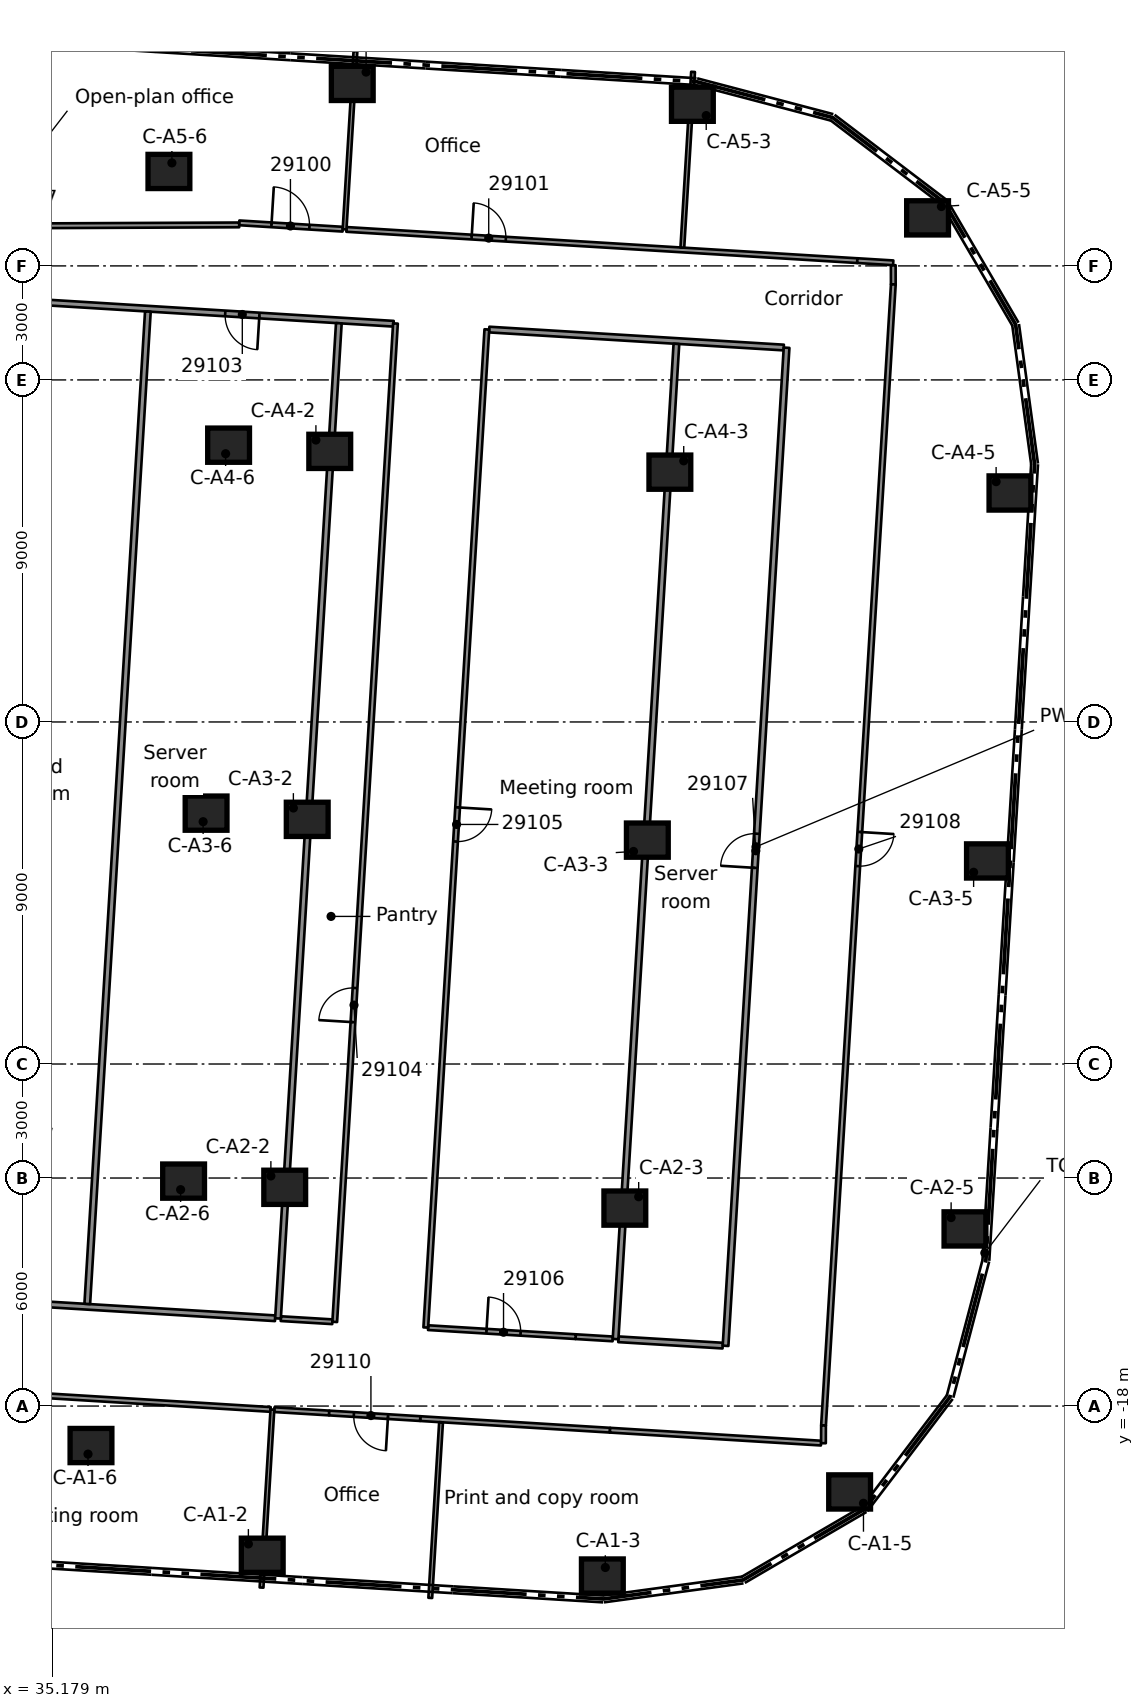
"""IFC4 building model, lengths in metres.
Left out: names, types, materials, properties, quantities, classifications, styles, units other than length and angle.
Written with IfcOpenShell. Run it as: python <this file> out.ifc"""

import sys

from ifc_helpers import new_model, si_unit, direction, frame, frame_2d, origin, origin_2d, place, context, subcontext, project, spatial, rectangle, extrude, element, fill, save


model = new_model("IFC4")
c1 = context("Model", 3, precision=1e-05, world=origin(), true_north=direction((0.0, 1.0)))
c2 = subcontext(c1, "Body", "Model", "MODEL_VIEW")
j1 = project(units=[si_unit("LENGTHUNIT", "METRE"), si_unit("PLANEANGLEUNIT", "RADIAN")], contexts=[c1])
p1 = place(None, origin())
s1 = spatial("IfcSite", under=j1, at=p1, CompositionType="ELEMENT")
p2 = place(p1, origin())
s2 = spatial("IfcBuilding", under=s1, at=p2, CompositionType="ELEMENT")
p3 = place(p2, frame((0.0, 0.0, 149.1)))
s3 = spatial("IfcBuildingStorey", under=s2, at=p3, CompositionType="ELEMENT", Elevation=149.1)
for number, where, z_axis, x_axis in (
    (1, (40.704, -21.926, 0.0), (0.0, 0.0, 1.0), (1.0, 0.0, 0.0)),
    (2, (49.654, -22.473, 0.0), (0.0, 0.0, 1.0), (1.0, 0.0, 0.0)),
    (3, (56.161, -20.26, 0.0), (0.0, 0.0, 1.0), (1.0, 0.0, 0.0)),
    (4, (36.198, -19.039, 0.0), (0.0, 0.0, 1.0), (1.0, 0.0, 0.0)),
    (5, (41.296, -12.244, 0.0), (0.0, 0.0, 1.0), (1.0, 0.0, 0.0)),
    (6, (50.246, -12.791, 0.0), (0.0, 0.0, 1.0), (1.0, 0.0, 0.0)),
    (7, (59.196, -13.339, 0.0), (0.0, 0.0, 1.0), (1.0, 0.0, 0.0)),
    (8, (38.635, -12.081, 0.0), (0.0, 0.0, 1.0), (1.0, 0.0, 0.0)),
    (9, (41.888, -2.562, 0.0), (0.0, 0.0, 1.0), (1.0, 0.0, 0.0)),
    (10, (50.838, -3.109, 0.0), (0.0, 0.0, 1.0), (1.0, 0.0, 0.0)),
    (11, (59.788, -3.657, 0.0), (0.0, 0.0, 1.0), (1.0, 0.0, 0.0)),
    (12, (39.227, -2.399, 0.0), (0.0, 0.0, 1.0), (1.0, 0.0, 0.0)),
    (13, (42.481, 7.12, 0.0), (0.0, 0.0, 1.0), (1.0, 0.0, 0.0)),
    (14, (51.431, 6.573, 0.0), (0.0, 0.0, 1.0), (1.0, 0.0, 0.0)),
    (15, (60.38, 6.025, 0.0), (0.0, 0.0, 1.0), (1.0, 0.0, 0.0)),
    (16, (39.819, 7.283, 0.0), (0.0, 0.0, 1.0), (1.0, 0.0, 0.0)),
    (17, (43.073, 16.802, 0.0), (0.0, 0.0, 1.0), (1.0, 0.0, 0.0)),
    (18, (52.023, 16.254, 0.0), (0.0, 0.0, 1.0), (1.0, 0.0, 0.0)),
    (19, (58.212, 13.264, 0.0), (0.0, 0.0, 1.0), (1.0, 0.0, 0.0)),
    (20, (38.249, 14.485, 0.0), (0.0, 0.0, 1.0), (1.0, 0.0, 0.0)),
):
    element("IfcColumn", number, at=place(p3, frame(where, z_axis=z_axis, x_axis=x_axis)), inside=s3, PredefinedType="COLUMN", context=c2, shape_type="SweptSolid", body=[
        extrude(rectangle(XDim=1.1, YDim=0.9, at=origin_2d()), origin(), (0.0, 0.0, 1.0), 3.5),
    ])
p4 = place(p3, frame((57.309, 12.018, 0.0), z_axis=(0.0, 0.0, 1.0), x_axis=(0.001937042371, -0.999998123932, 0.0)))
e21 = element("IfcWall", 21, at=p4, inside=s3, PredefinedType="PARTITIONING", context=c2, shape_type="SweptSolid", body=[
    extrude(rectangle(XDim=0.504, YDim=0.125, at=frame_2d((0.252, 0.0))), origin(), (0.0, 0.0, 1.0), 3.08),
])
p5 = place(p3, frame((41.022, -18.095, 0.0), z_axis=(0.0, 0.0, 1.0), x_axis=(0.9981427784, -0.060917927811, 0.0)))
e22 = element("IfcWall", 22, at=p5, inside=s3, PredefinedType="PARTITIONING", context=c2, shape_type="SweptSolid", body=[
    extrude(rectangle(XDim=1.447, YDim=0.125, at=frame_2d((0.723, 0.0))), origin(), (0.0, 0.0, 1.0), 3.08),
])
p6 = place(p3, frame((49.855, -18.635, 0.0), z_axis=(0.0, 0.0, 1.0), x_axis=(-0.998140256912, 0.060959228443, 0.0)))
e23 = element("IfcWall", 23, at=p6, inside=s3, PredefinedType="PARTITIONING", context=c2, shape_type="SweptSolid", body=[
    extrude(rectangle(XDim=5.002, YDim=0.125, at=frame_2d((2.501, 0.0))), origin(), (0.0, 0.0, 1.0), 3.08),
])
p7 = place(p3, frame((49.855, -18.635, 0.0), z_axis=(0.0, 0.0, 1.0), x_axis=(0.998130487354, -0.061118984082, 0.0)))
e24 = element("IfcWall", 24, at=p7, inside=s3, PredefinedType="PARTITIONING", context=c2, shape_type="SweptSolid", body=[
    extrude(rectangle(XDim=5.564, YDim=0.125, at=frame_2d((2.782, 0.0))), origin(), (0.0, 0.0, 1.0), 3.08),
])
p8 = place(p3, frame((40.923, -18.089, 0.0), z_axis=(0.0, 0.0, 1.0), x_axis=(-0.998135704692, 0.06103372034, 0.0)))
e25 = element("IfcWall", 25, at=p8, inside=s3, PredefinedType="PARTITIONING", context=c2, shape_type="SweptSolid", body=[
    extrude(rectangle(XDim=10.208, YDim=0.125, at=frame_2d((5.104, 0.0))), origin(), (0.0, 0.0, 1.0), 3.08),
])
p9 = place(p8, frame((7.938, 0.0, 0.0)))
e26 = element("IfcOpeningElement", 26, at=p9, cuts=e25, PredefinedType="OPENING", context=c2, shape_type="SweptSolid", body=[
    extrude(rectangle(XDim=0.9, YDim=2.1, at=frame_2d((0.45, 1.05))), frame((0.0, 0.073, 0.0), z_axis=(0.0, -1.0, 0.0), x_axis=(1.0, 0.0, 0.0)), (0.0, 0.0, 1.0), 0.145),
])
p10 = place(p3, frame((44.862, -18.33, 0.0), z_axis=(0.0, 0.0, 1.0), x_axis=(-0.998123937102, 0.061225862048, 0.0)))
e27 = element("IfcWall", 27, at=p10, inside=s3, PredefinedType="PARTITIONING", context=c2, shape_type="SweptSolid", body=[
    extrude(rectangle(XDim=2.4, YDim=0.125, at=frame_2d((1.2, 0.0))), origin(), (0.0, 0.0, 1.0), 3.08),
])
p11 = place(p10, frame((0.85, 0.0, 0.0)))
e28 = element("IfcOpeningElement", 28, at=p11, cuts=e27, PredefinedType="OPENING", context=c2, shape_type="SweptSolid", body=[
    extrude(rectangle(XDim=0.9, YDim=2.1, at=frame_2d((0.45, 1.05))), frame((0.0, 0.073, 0.0), z_axis=(0.0, -1.0, 0.0), x_axis=(1.0, 0.0, 0.0)), (0.0, 0.0, 1.0), 0.145),
])
p12 = place(p3, frame((41.194, -15.7, 0.0), z_axis=(0.0, 0.0, 1.0), x_axis=(0.998175067926, -0.060386536338, 0.0)))
e29 = element("IfcWall", 29, at=p12, inside=s3, PredefinedType="PARTITIONING", context=c2, shape_type="SweptSolid", body=[
    extrude(rectangle(XDim=1.358, YDim=0.125, at=frame_2d((0.679, 0.0))), origin(), (0.0, 0.0, 1.0), 3.08),
])
p13 = place(p3, frame((48.952, -16.174, 0.0), z_axis=(0.0, 0.0, 1.0), x_axis=(0.998184467613, -0.060230960615, 0.0)))
e30 = element("IfcWall", 30, at=p13, inside=s3, PredefinedType="PARTITIONING", context=c2, shape_type="SweptSolid", body=[
    extrude(rectangle(XDim=0.977, YDim=0.125, at=frame_2d((0.488, 0.0))), origin(), (0.0, 0.0, 1.0), 3.08),
])
p14 = place(p3, frame((31.165, -15.087, 0.0), z_axis=(0.0, 0.0, 1.0), x_axis=(0.998142132741, -0.060928506027, 0.0)))
e31 = element("IfcWall", 31, at=p14, inside=s3, PredefinedType="PARTITIONING", context=c2, shape_type="SweptSolid", body=[
    extrude(rectangle(XDim=9.897, YDim=0.15, at=frame_2d((4.949, 0.0))), origin(), (0.0, 0.0, 1.0), 3.08),
])
p15 = place(p14, frame((2.006, 0.0, 0.0)))
e32 = element("IfcOpeningElement", 32, at=p15, cuts=e31, PredefinedType="OPENING", context=c2, shape_type="SweptSolid", body=[
    extrude(rectangle(XDim=0.9, YDim=2.1, at=frame_2d((0.45, 1.05))), frame((0.0, 0.085, 0.0), z_axis=(0.0, -1.0, 0.0), x_axis=(1.0, 0.0, 0.0)), (0.0, 0.0, 1.0), 0.17),
])
p16 = place(p3, frame((45.07, -15.937, 0.0), z_axis=(0.0, 0.0, 1.0), x_axis=(0.998140477109, -0.060955622847, 0.0)))
e33 = element("IfcWall", 33, at=p16, inside=s3, PredefinedType="PARTITIONING", context=c2, shape_type="SweptSolid", body=[
    extrude(rectangle(XDim=3.889, YDim=0.125, at=frame_2d((1.945, 0.0))), origin(), (0.0, 0.0, 1.0), 3.08),
])
p17 = place(p16, frame((1.538, 0.0, 0.0)))
e34 = element("IfcOpeningElement", 34, at=p17, cuts=e33, PredefinedType="OPENING", context=c2, shape_type="SweptSolid", body=[
    extrude(rectangle(XDim=0.9, YDim=2.1, at=frame_2d((0.45, 1.05))), frame((0.0, 0.073, 0.0), z_axis=(0.0, -1.0, 0.0), x_axis=(1.0, 0.0, 0.0)), (0.0, 0.0, 1.0), 0.145),
])
p18 = place(p3, frame((50.077, -16.243, 0.0), z_axis=(0.0, 0.0, 1.0), x_axis=(0.998153516583, -0.060741726454, 0.0)))
e35 = element("IfcWall", 35, at=p18, inside=s3, PredefinedType="PARTITIONING", context=c2, shape_type="SweptSolid", body=[
    extrude(rectangle(XDim=2.749, YDim=0.15, at=frame_2d((1.375, 0.0))), origin(), (0.0, 0.0, 1.0), 3.08),
])
p19 = place(p3, frame((44.16, 10.478, 0.0), z_axis=(0.0, 0.0, 1.0), x_axis=(-0.998127894331, 0.061161315872, 0.0)))
e36 = element("IfcWall", 36, at=p19, inside=s3, PredefinedType="PARTITIONING", context=c2, shape_type="SweptSolid", body=[
    extrude(rectangle(XDim=11.428, YDim=0.15, at=frame_2d((5.714, 0.0))), origin(), (0.0, 0.0, 1.0), 3.08),
])
p20 = place(p19, frame((3.538, 0.0, 0.0)))
e37 = element("IfcOpeningElement", 37, at=p20, cuts=e36, PredefinedType="OPENING", context=c2, shape_type="SweptSolid", body=[
    extrude(rectangle(XDim=0.9, YDim=2.1, at=frame_2d((0.45, 1.05))), frame((0.0, 0.085, 0.0), z_axis=(0.0, -1.0, 0.0), x_axis=(1.0, 0.0, 0.0)), (0.0, 0.0, 1.0), 0.17),
])
p21 = place(p3, frame((46.677, 10.325, 0.0), z_axis=(0.0, 0.0, 1.0), x_axis=(0.998143498814, -0.060906122644, 0.0)))
e38 = element("IfcWall", 38, at=p21, inside=s3, PredefinedType="PARTITIONING", context=c2, shape_type="SweptSolid", body=[
    extrude(rectangle(XDim=7.764, YDim=0.15, at=frame_2d((3.882, 0.0))), origin(), (0.0, 0.0, 1.0), 3.08),
])
p22 = place(p3, frame((42.921, 12.96, 0.0), z_axis=(0.0, 0.0, 1.0), x_axis=(0.998135679052, -0.061034139647, 0.0)))
e39 = element("IfcWall", 39, at=p22, inside=s3, PredefinedType="PARTITIONING", context=c2, shape_type="SweptSolid", body=[
    extrude(rectangle(XDim=13.468, YDim=0.125, at=frame_2d((6.734, 0.0))), origin(), (0.0, 0.0, 1.0), 3.08),
])
p23 = place(p22, frame((3.3, 0.0, 0.0)))
e40 = element("IfcOpeningElement", 40, at=p23, cuts=e39, PredefinedType="OPENING", context=c2, shape_type="SweptSolid", body=[
    extrude(rectangle(XDim=0.9, YDim=2.1, at=frame_2d((0.45, 1.05))), frame((0.0, 0.073, 0.0), z_axis=(0.0, -1.0, 0.0), x_axis=(1.0, 0.0, 0.0)), (0.0, 0.0, 1.0), 0.145),
])
p24 = place(p3, frame((40.099, 13.133, 0.0), z_axis=(0.0, 0.0, 1.0), x_axis=(0.998123336101, -0.061235658973, 0.0)))
e41 = element("IfcWall", 41, at=p24, inside=s3, PredefinedType="PARTITIONING", context=c2, shape_type="SweptSolid", body=[
    extrude(rectangle(XDim=2.727, YDim=0.125, at=frame_2d((1.364, 0.0))), origin(), (0.0, 0.0, 1.0), 3.08),
])
p25 = place(p24, frame((0.85, 0.0, 0.0)))
e42 = element("IfcOpeningElement", 42, at=p25, cuts=e41, PredefinedType="OPENING", context=c2, shape_type="SweptSolid", body=[
    extrude(rectangle(XDim=1.0, YDim=2.1, at=frame_2d((0.5, 1.05))), frame((0.0, 0.073, 0.0), z_axis=(0.0, -1.0, 0.0), x_axis=(1.0, 0.0, 0.0)), (0.0, 0.0, 1.0), 0.145),
])
p26 = place(p3, frame((56.362, 12.139, 0.0), z_axis=(0.0, 0.0, 1.0), x_axis=(0.998134879302, -0.061047217134, 0.0)))
e43 = element("IfcWall", 43, at=p26, inside=s3, PredefinedType="PARTITIONING", context=c2, shape_type="SweptSolid", body=[
    extrude(rectangle(XDim=0.948, YDim=0.125, at=frame_2d((0.474, 0.0))), origin(), (0.0, 0.0, 1.0), 3.08),
])
p27 = place(p3, frame((31.471, 13.041, 0.0), z_axis=(0.0, 0.0, 1.0), x_axis=(0.999990255084, 0.004414718129, 0.0)))
e44 = element("IfcWall", 44, at=p27, inside=s3, PredefinedType="PARTITIONING", context=c2, shape_type="SweptSolid", body=[
    extrude(rectangle(XDim=8.627, YDim=0.125, at=frame_2d((4.313, 0.0))), origin(), (0.0, 0.0, 1.0), 3.08),
])
p28 = place(p3, frame((57.311, 11.514, 0.0), z_axis=(0.0, 0.0, 1.0), x_axis=(-0.061067487699, -0.998133639322, 0.0)))
e45 = element("IfcWall", 45, at=p28, inside=s3, PredefinedType="PARTITIONING", context=c2, shape_type="SweptSolid", body=[
    extrude(rectangle(XDim=30.08, YDim=0.125, at=frame_2d((15.04, 0.0))), origin(), (0.0, 0.0, 1.0), 3.08),
])
p29 = place(p28, frame((14.435, 0.0, 0.0)))
e46 = element("IfcOpeningElement", 46, at=p29, cuts=e45, PredefinedType="OPENING", context=c2, shape_type="SweptSolid", body=[
    extrude(rectangle(XDim=0.9, YDim=2.1, at=frame_2d((0.45, 1.05))), frame((0.0, 0.073, 0.0), z_axis=(0.0, -1.0, 0.0), x_axis=(1.0, 0.0, 0.0)), (0.0, 0.0, 1.0), 0.145),
])
p30 = place(p3, frame((52.896, -16.415, 0.0), z_axis=(0.0, 0.0, 1.0), x_axis=(0.061037428755, 0.998135477924, 0.0)))
e47 = element("IfcWall", 47, at=p30, inside=s3, PredefinedType="PARTITIONING", context=c2, shape_type="SweptSolid", body=[
    extrude(rectangle(XDim=26.311, YDim=0.15, at=frame_2d((13.156, 0.0))), origin(), (0.0, 0.0, 1.0), 3.08),
])
p31 = place(p30, frame((12.6, 0.0, 0.0)))
e48 = element("IfcOpeningElement", 48, at=p31, cuts=e47, PredefinedType="OPENING", context=c2, shape_type="SweptSolid", body=[
    extrude(rectangle(XDim=0.9, YDim=2.1, at=frame_2d((0.45, 1.05))), frame((0.0, 0.085, 0.0), z_axis=(0.0, -1.0, 0.0), x_axis=(1.0, 0.0, 0.0)), (0.0, 0.0, 1.0), 0.17),
])
p32 = place(p3, frame((50.002, -16.238, 0.0), z_axis=(0.0, 0.0, 1.0), x_axis=(0.061026057913, 0.998136173203, 0.0)))
e49 = element("IfcWall", 49, at=p32, inside=s3, PredefinedType="PARTITIONING", context=c2, shape_type="SweptSolid", body=[
    extrude(rectangle(XDim=26.236, YDim=0.15, at=frame_2d((13.118, 0.0))), origin(), (0.0, 0.0, 1.0), 3.08),
])
p33 = place(p3, frame((51.759, 12.482, 0.0), z_axis=(0.0, 0.0, 1.0), x_axis=(0.060881783699, 0.998144983664, 0.0)))
e50 = element("IfcWall", 50, at=p33, inside=s3, PredefinedType="PARTITIONING", context=c2, shape_type="SweptSolid", body=[
    extrude(rectangle(XDim=4.632, YDim=0.1, at=frame_2d((2.316, 0.0))), origin(), (0.0, 0.0, 1.0), 3.08),
])
p34 = place(p3, frame((45.126, -23.048, 0.0), z_axis=(0.0, 0.0, 1.0), x_axis=(0.061314799781, 0.998118477601, 0.0)))
e51 = element("IfcWall", 51, at=p34, inside=s3, PredefinedType="PARTITIONING", context=c2, shape_type="SweptSolid", body=[
    extrude(rectangle(XDim=4.631, YDim=0.1, at=frame_2d((2.315, 0.0))), origin(), (0.0, 0.0, 1.0), 3.08),
])
p35 = place(p3, frame((46.615, 10.329, 0.0), z_axis=(0.0, 0.0, 1.0), x_axis=(-0.061073840806, -0.998133250608, 0.0)))
e52 = element("IfcWall", 52, at=p35, inside=s3, PredefinedType="PARTITIONING", context=c2, shape_type="SweptSolid", body=[
    extrude(rectangle(XDim=26.311, YDim=0.125, at=frame_2d((13.156, 0.0))), origin(), (0.0, 0.0, 1.0), 3.08),
])
p36 = place(p35, frame((12.6, 0.0, 0.0)))
e53 = element("IfcOpeningElement", 53, at=p36, cuts=e52, PredefinedType="OPENING", context=c2, shape_type="SweptSolid", body=[
    extrude(rectangle(XDim=0.9, YDim=2.1, at=frame_2d((0.45, 1.05))), frame((0.0, 0.073, 0.0), z_axis=(0.0, -1.0, 0.0), x_axis=(1.0, 0.0, 0.0)), (0.0, 0.0, 1.0), 0.145),
])
p37 = place(p3, frame((42.612, -15.786, 0.0), z_axis=(0.0, 0.0, 1.0), x_axis=(0.060711547525, 0.998155352637, 0.0)))
e54 = element("IfcWall", 54, at=p37, inside=s3, PredefinedType="PARTITIONING", context=c2, shape_type="SweptSolid", body=[
    extrude(rectangle(XDim=26.32, YDim=0.125, at=frame_2d((13.16, 0.0))), origin(), (0.0, 0.0, 1.0), 3.08),
])
p38 = place(p37, frame((7.902, 0.0, 0.0)))
e55 = element("IfcOpeningElement", 55, at=p38, cuts=e54, PredefinedType="OPENING", context=c2, shape_type="SweptSolid", body=[
    extrude(rectangle(XDim=0.9, YDim=2.1, at=frame_2d((0.45, 1.05))), frame((0.0, 0.073, 0.0), z_axis=(0.0, -1.0, 0.0), x_axis=(1.0, 0.0, 0.0)), (0.0, 0.0, 1.0), 0.145),
])
p39 = place(p3, frame((40.686, -22.776, 0.0), z_axis=(0.0, 0.0, 1.0), x_axis=(0.060923886766, 0.998142414699, 0.0)))
e56 = element("IfcWall", 56, at=p39, inside=s3, PredefinedType="PARTITIONING", context=c2, shape_type="SweptSolid", body=[
    extrude(rectangle(XDim=4.693, YDim=0.1, at=frame_2d((2.346, 0.0))), origin(), (0.0, 0.0, 1.0), 3.08),
])
p40 = place(p3, frame((41.119, -15.695, 0.0), z_axis=(0.0, 0.0, 1.0), x_axis=(0.061026057913, 0.998136173203, 0.0)))
e57 = element("IfcWall", 57, at=p40, inside=s3, PredefinedType="PARTITIONING", context=c2, shape_type="SweptSolid", body=[
    extrude(rectangle(XDim=26.236, YDim=0.15, at=frame_2d((13.118, 0.0))), origin(), (0.0, 0.0, 1.0), 3.08),
])
p41 = place(p3, frame((42.871, 12.963, 0.0), z_axis=(0.0, 0.0, 1.0), x_axis=(0.0609080718, 0.998143379876, 0.0)))
e58 = element("IfcWall", 58, at=p41, inside=s3, PredefinedType="PARTITIONING", context=c2, shape_type="SweptSolid", body=[
    extrude(rectangle(XDim=4.694, YDim=0.1, at=frame_2d((2.347, 0.0))), origin(), (0.0, 0.0, 1.0), 3.08),
])
p42 = place(p3, frame((36.1, -15.313, 0.0), z_axis=(0.0, 0.0, 1.0), x_axis=(0.060968133748, 0.998139713, 0.0)))
e59 = element("IfcWall", 59, at=p42, inside=s3, PredefinedType="PARTITIONING", context=c2, shape_type="SweptSolid", body=[
    extrude(rectangle(XDim=26.161, YDim=0.15, at=frame_2d((13.08, 0.0))), origin(), (0.0, 0.0, 1.0), 3.08),
])
p43 = place(p3, frame((55.472, -18.978, 0.0), z_axis=(0.0, 0.0, 1.0), x_axis=(0.004694783941, 0.999988979441, 0.0)))
e60 = element("IfcWall", 60, at=p43, inside=s3, PredefinedType="PARTITIONING", context=c2, shape_type="SweptSolid", body=[
    extrude(rectangle(XDim=0.468, YDim=0.125, at=frame_2d((0.234, 0.0))), origin(), (0.0, 0.0, 1.0), 3.08),
])
p44 = place(p25, origin())
e61 = element("IfcDoor", 61, at=p44, inside=s3, OperationType="SINGLE_SWING_LEFT", PredefinedType="DOOR", context=c2, shape_type="SweptSolid", body=[
    extrude(rectangle(XDim=1.0, YDim=2.1, at=frame_2d((0.5, 1.05))), frame((0.0, 0.025, 0.0), z_axis=(0.0, -1.0, 0.0), x_axis=(1.0, 0.0, 0.0)), (0.0, 0.0, 1.0), 0.05),
])
fill(e42, e61)
p45 = place(p23, origin())
e62 = element("IfcDoor", 62, at=p45, inside=s3, OperationType="SINGLE_SWING_LEFT", PredefinedType="DOOR", context=c2, shape_type="SweptSolid", body=[
    extrude(rectangle(XDim=0.9, YDim=2.1, at=frame_2d((0.45, 1.05))), frame((0.0, 0.025, 0.0), z_axis=(0.0, -1.0, 0.0), x_axis=(1.0, 0.0, 0.0)), (0.0, 0.0, 1.0), 0.05),
])
fill(e40, e62)
p46 = place(p20, origin())
e63 = element("IfcDoor", 63, at=p46, inside=s3, OperationType="SINGLE_SWING_LEFT", PredefinedType="DOOR", context=c2, shape_type="SweptSolid", body=[
    extrude(rectangle(XDim=0.9, YDim=2.1, at=frame_2d((0.45, 1.05))), frame((0.0, 0.025, 0.0), z_axis=(0.0, -1.0, 0.0), x_axis=(1.0, 0.0, 0.0)), (0.0, 0.0, 1.0), 0.05),
])
fill(e37, e63)
p47 = place(p38, origin())
e64 = element("IfcDoor", 64, at=p47, inside=s3, OperationType="SINGLE_SWING_LEFT", PredefinedType="DOOR", context=c2, shape_type="SweptSolid", body=[
    extrude(rectangle(XDim=0.9, YDim=2.1, at=frame_2d((0.45, 1.05))), frame((0.0, 0.025, 0.0), z_axis=(0.0, -1.0, 0.0), x_axis=(1.0, 0.0, 0.0)), (0.0, 0.0, 1.0), 0.05),
])
fill(e55, e64)
p48 = place(p36, origin())
e65 = element("IfcDoor", 65, at=p48, inside=s3, OperationType="SINGLE_SWING_LEFT", PredefinedType="DOOR", context=c2, shape_type="SweptSolid", body=[
    extrude(rectangle(XDim=0.9, YDim=2.1, at=frame_2d((0.45, 1.05))), frame((0.0, 0.025, 0.0), z_axis=(0.0, -1.0, 0.0), x_axis=(1.0, 0.0, 0.0)), (0.0, 0.0, 1.0), 0.05),
])
fill(e53, e65)
p49 = place(p17, origin())
e66 = element("IfcDoor", 66, at=p49, inside=s3, OperationType="SINGLE_SWING_RIGHT", PredefinedType="DOOR", context=c2, shape_type="SweptSolid", body=[
    extrude(rectangle(XDim=0.9, YDim=2.1, at=frame_2d((0.45, 1.05))), frame((0.0, 0.025, 0.0), z_axis=(0.0, -1.0, 0.0), x_axis=(1.0, 0.0, 0.0)), (0.0, 0.0, 1.0), 0.05),
])
fill(e34, e66)
p50 = place(p31, origin())
e67 = element("IfcDoor", 67, at=p50, inside=s3, OperationType="SINGLE_SWING_LEFT", PredefinedType="DOOR", context=c2, shape_type="SweptSolid", body=[
    extrude(rectangle(XDim=0.9, YDim=2.1, at=frame_2d((0.45, 1.05))), frame((0.0, 0.025, 0.0), z_axis=(0.0, -1.0, 0.0), x_axis=(1.0, 0.0, 0.0)), (0.0, 0.0, 1.0), 0.05),
])
fill(e48, e67)
p51 = place(p29, origin())
e68 = element("IfcDoor", 68, at=p51, inside=s3, OperationType="SINGLE_SWING_LEFT", PredefinedType="DOOR", context=c2, shape_type="SweptSolid", body=[
    extrude(rectangle(XDim=0.9, YDim=2.1, at=frame_2d((0.45, 1.05))), frame((0.0, 0.025, 0.0), z_axis=(0.0, -1.0, 0.0), x_axis=(1.0, 0.0, 0.0)), (0.0, 0.0, 1.0), 0.05),
])
fill(e46, e68)
p52 = place(p11, origin())
e69 = element("IfcDoor", 69, at=p52, inside=s3, OperationType="SINGLE_SWING_RIGHT", PredefinedType="DOOR", context=c2, shape_type="SweptSolid", body=[
    extrude(rectangle(XDim=0.9, YDim=2.1, at=frame_2d((0.45, 1.05))), frame((0.0, 0.025, 0.0), z_axis=(0.0, -1.0, 0.0), x_axis=(1.0, 0.0, 0.0)), (0.0, 0.0, 1.0), 0.05),
])
fill(e28, e69)
save(model, sys.argv[1])
